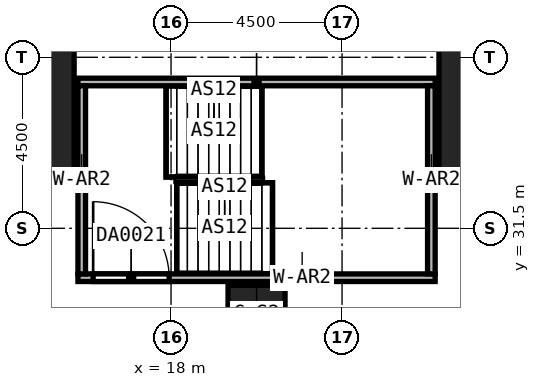
"""IFC4 building model, lengths in metres.
Left out: names, types, materials, properties, quantities, classifications, styles, units other than length and angle.
Written with IfcOpenShell. Run it as: python <this file> out.ifc"""

import sys

from ifc_helpers import new_model, si_unit, direction, frame, frame_2d, origin, origin_2d, place, context, subcontext, project, spatial, rectangle, extrude, element, fill, save


model = new_model("IFC4")
c1 = context("Model", 3, precision=1e-05, world=origin(), true_north=direction((0.0, 1.0)))
c2 = subcontext(c1, "Body", "Model", "MODEL_VIEW")
j1 = project(units=[si_unit("LENGTHUNIT", "METRE"), si_unit("PLANEANGLEUNIT", "RADIAN")], contexts=[c1])
p1 = place(None, origin())
s1 = spatial("IfcSite", under=j1, at=p1, CompositionType="ELEMENT")
p2 = place(p1, origin())
s2 = spatial("IfcBuilding", under=s1, at=p2, CompositionType="ELEMENT")
p3 = place(p2, frame((0.0, 0.0, 19.0)))
s3 = spatial("IfcBuildingStorey", under=s2, at=p3, CompositionType="ELEMENT", Elevation=19.0)
for number, where, z_axis, x_axis in (
    (1, (13.5, 35.85, 0.0), (0.0, 0.0, 1.0), (1.0, 0.0, 0.0)),
    (2, (27.0, 35.85, 0.0), (0.0, 0.0, 1.0), (1.0, 0.0, 0.0)),
):
    element("IfcColumn", number, at=place(p3, frame(where, z_axis=z_axis, x_axis=x_axis)), inside=s3, PredefinedType="COLUMN", context=c2, shape_type="SweptSolid", body=[
        extrude(rectangle(XDim=3.9, YDim=6.3, at=origin_2d()), origin(), (0.0, 0.0, 1.0), 6.0),
    ])
p4 = place(p3, frame((20.25, 29.25, 0.0), z_axis=(0.0, 0.0, 1.0), x_axis=(1.0, 0.0, 0.0)))
e3 = element("IfcColumn", 3, at=p4, inside=s3, PredefinedType="COLUMN", context=c2, shape_type="SweptSolid", body=[
    extrude(rectangle(XDim=1.5, YDim=1.5, at=origin_2d()), origin(), (0.0, 0.0, 1.0), 6.0),
])
p5 = place(p3, frame((15.55, 30.2, 0.0), z_axis=(0.0, 0.0, 1.0), x_axis=(1.0, 0.0, 0.0)))
e4 = element("IfcWall", 4, at=p5, inside=s3, PredefinedType="SOLIDWALL", context=c2, shape_type="SweptSolid", body=[
    extrude(rectangle(XDim=9.4, YDim=0.2, at=frame_2d((4.7, 0.0))), origin(), (0.0, 0.0, 1.0), 6.0),
])
p6 = place(p5, frame((0.4, 0.0, 0.0)))
e5 = element("IfcOpeningElement", 5, at=p6, cuts=e4, PredefinedType="OPENING", context=c2, shape_type="SweptSolid", body=[
    extrude(rectangle(XDim=2.0, YDim=2.4, at=frame_2d((1.0, 1.2))), frame((0.0, 0.1, 0.0), z_axis=(0.0, -1.0, 0.0), x_axis=(1.0, 0.0, 0.0)), (0.0, 0.0, 1.0), 0.2),
])
p7 = place(p3, frame((15.55, 35.35, 0.0), z_axis=(0.0, 0.0, 1.0), x_axis=(1.0, 0.0, 0.0)))
e6 = element("IfcWall", 6, at=p7, inside=s3, PredefinedType="SOLIDWALL", context=c2, shape_type="SweptSolid", body=[
    extrude(rectangle(XDim=9.4, YDim=0.2, at=frame_2d((4.7, 0.0))), origin(), (0.0, 0.0, 1.0), 6.0),
])
for number, where, z_axis, x_axis in (
    (7, (15.65, 30.3, 0.0), (0.0, 0.0, 1.0), (0.0, 1.0, 0.0)),
    (8, (24.85, 30.3, 0.0), (0.0, 0.0, 1.0), (0.0, 1.0, 0.0)),
):
    element("IfcWall", number, at=place(p3, frame(where, z_axis=z_axis, x_axis=x_axis)), inside=s3, PredefinedType="SOLIDWALL", context=c2, shape_type="SweptSolid", body=[
        extrude(rectangle(XDim=4.95, YDim=0.2, at=frame_2d((2.475, 0.0))), origin(), (0.0, 0.0, 1.0), 6.0),
    ])
p8 = place(p6, origin())
e9 = element("IfcDoor", 9, at=p8, inside=s3, OperationType="DOUBLE_DOOR_SINGLE_SWING", PredefinedType="DOOR", context=c2, shape_type="SweptSolid", body=[
    extrude(rectangle(XDim=2.0, YDim=2.4, at=frame_2d((1.0, 1.2))), frame((0.0, 0.025, 0.0), z_axis=(0.0, -1.0, 0.0), x_axis=(1.0, 0.0, 0.0)), (0.0, 0.0, 1.0), 0.05),
])
fill(e5, e9)
save(model, sys.argv[1])
